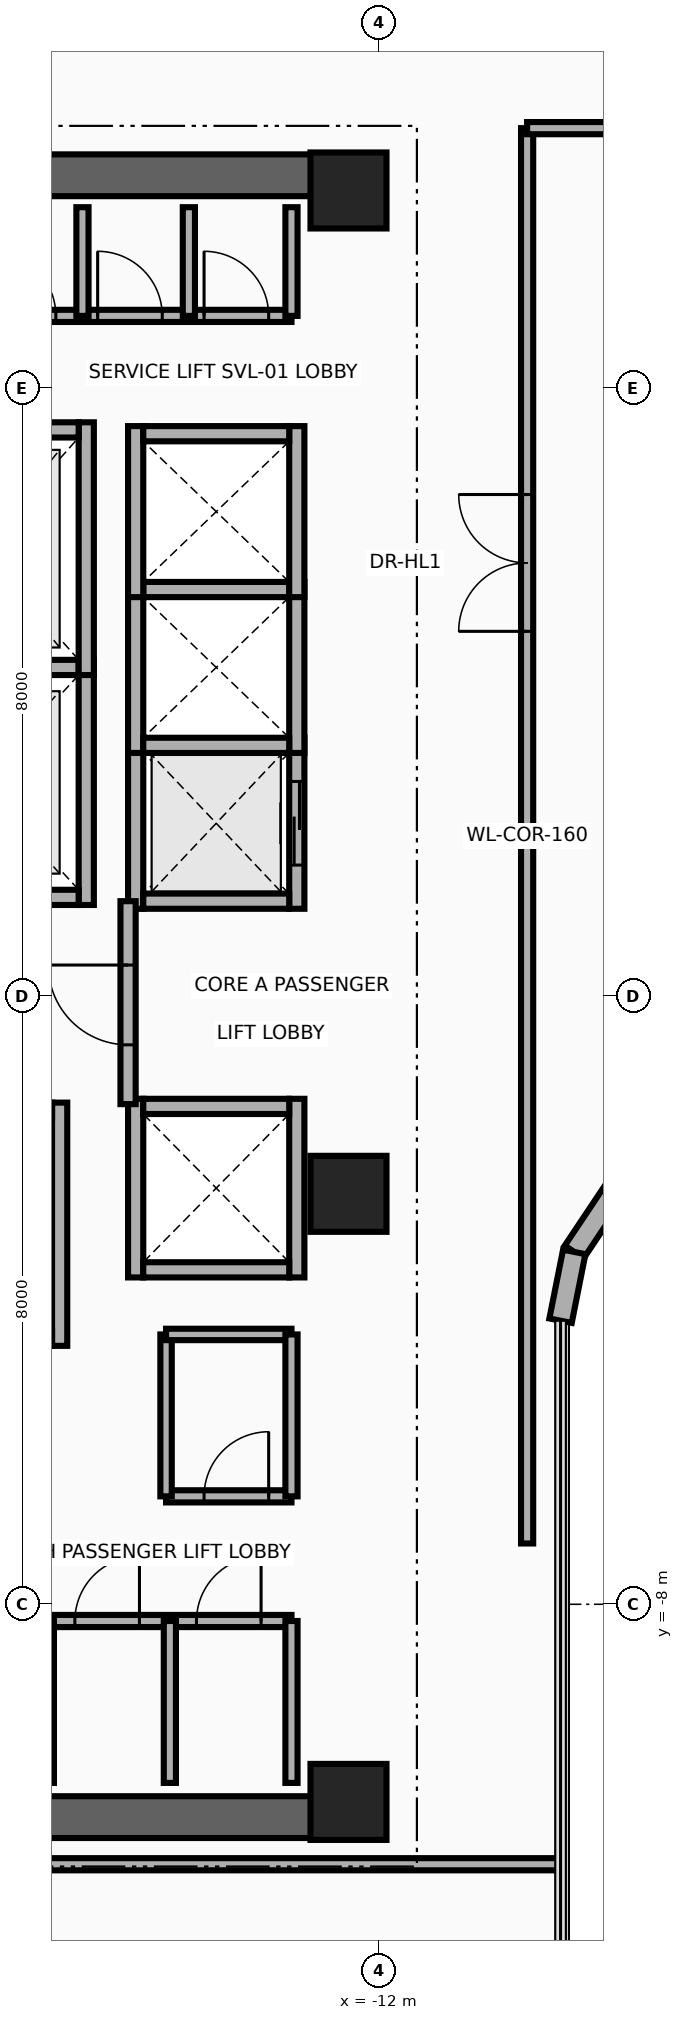
"""IFC4 building model, lengths in metres.
Left out: names, types, materials, properties, quantities, classifications, styles, units other than length and angle.
Written with IfcOpenShell. Run it as: python <this file> out.ifc"""

import sys

from ifc_helpers import new_model, si_unit, direction, frame, frame_2d, origin, origin_2d, place, context, subcontext, project, spatial, rectangle, extrude, source, transform, mapped, element, fill, save


model = new_model("IFC4")
c1 = context("Model", 3, precision=1e-05, world=origin(), true_north=direction((0.0, 1.0)))
c2 = subcontext(c1, "Body", "Model", "MODEL_VIEW")
j1 = project(units=[si_unit("LENGTHUNIT", "METRE"), si_unit("PLANEANGLEUNIT", "RADIAN")], contexts=[c1])
p1 = place(None, origin())
s1 = spatial("IfcSite", under=j1, at=p1, CompositionType="ELEMENT")
p2 = place(p1, origin())
s2 = spatial("IfcBuilding", under=s1, at=p2, CompositionType="ELEMENT")
p3 = place(p2, frame((0.0, 0.0, 184.45)))
s3 = spatial("IfcBuildingStorey", under=s2, at=p3, CompositionType="ELEMENT", Elevation=184.45)
for number, where, z_axis, x_axis in (
    (1, (-22.65, 10.8, 0.0), (0.0, 0.0, 1.0), (1.0, 0.0, 0.0)),
    (2, (-22.65, -10.8, 0.0), (0.0, 0.0, 1.0), (1.0, 0.0, 0.0)),
):
    element("IfcWall", number, at=place(p3, frame(where, z_axis=z_axis, x_axis=x_axis)), inside=s3, PredefinedType="SHEAR", context=c2, shape_type="SweptSolid", body=[
        extrude(rectangle(XDim=10.25, YDim=0.55, at=frame_2d((5.125, 0.0))), origin(), (0.0, 0.0, 1.0), 3.63),
    ])
m1 = source(origin(), c2, "Body", "SweptSolid", [
    extrude(rectangle(XDim=1.0, YDim=1.0, at=origin_2d()), origin(), (0.0, 0.0, 1.0), 3.95),
])
for number, where, z_axis, x_axis in (
    (3, (-12.4, -10.6, 0.0), (0.0, 0.0, 1.0), (1.0, 0.0, 0.0)),
    (4, (-12.4, -2.6, 0.0), (0.0, 0.0, 1.0), (1.0, 0.0, 0.0)),
    (5, (-12.4, 10.6, 0.0), (0.0, 0.0, 1.0), (1.0, 0.0, 0.0)),
):
    element("IfcColumn", number, at=place(p3, frame(where, z_axis=z_axis, x_axis=x_axis)), inside=s3, PredefinedType="COLUMN", context=c2, shape_type="MappedRepresentation", body=[
        mapped(m1, transform((0.0, 0.0, 0.0), x_axis=(1.0, 0.0, 0.0), y_axis=(0.0, 1.0, 0.0), z_axis=(0.0, 0.0, 1.0), scale=1.0)),
    ])
p4 = place(p3, frame((-8.912, -2.588, 0.0), z_axis=(0.0, 0.0, 1.0), x_axis=(-0.555364065883, -0.831607331814, 0.0)))
e6 = element("IfcWall", 6, at=p4, inside=s3, PredefinedType="SOLIDWALL", context=c2, shape_type="SweptSolid", body=[
    extrude(rectangle(XDim=0.933, YDim=0.3, at=frame_2d((0.467, 0.0))), origin(), (0.0, 0.0, 1.0), 3.63),
])
p5 = place(p3, frame((-9.43, -3.365, 0.0), z_axis=(0.0, 0.0, 1.0), x_axis=(-0.195301801101, -0.980743190895, 0.0)))
e7 = element("IfcWall", 7, at=p5, inside=s3, PredefinedType="SOLIDWALL", context=c2, shape_type="SweptSolid", body=[
    extrude(rectangle(XDim=0.923, YDim=0.3, at=frame_2d((0.461, 0.0))), origin(), (0.0, 0.0, 1.0), 3.63),
])
p6 = place(p3, frame((-15.85, 1.2, 0.0), z_axis=(0.0, 0.0, 1.0), x_axis=(0.0, 1.0, 0.0)))
e8 = element("IfcWall", 8, at=p6, inside=s3, PredefinedType="MOVABLE", context=c2, shape_type="SweptSolid", body=[
    extrude(rectangle(XDim=3.225, YDim=0.2, at=frame_2d((1.613, 0.0))), origin(), (0.0, 0.0, 1.0), 3.63),
])
p7 = place(p3, frame((-18.55, 1.3, 0.0), z_axis=(0.0, 0.0, 1.0), x_axis=(1.0, 0.0, 0.0)))
e9 = element("IfcWall", 9, at=p7, inside=s3, PredefinedType="MOVABLE", context=c2, shape_type="SweptSolid", body=[
    extrude(rectangle(XDim=2.6, YDim=0.2, at=frame_2d((1.3, 0.0))), origin(), (0.0, 0.0, 1.0), 3.63),
])
p8 = place(p7, frame((0.7, 0.0, 0.0)))
e10 = element("IfcOpeningElement", 10, at=p8, cuts=e9, PredefinedType="OPENING", context=c2, shape_type="SweptSolid", body=[
    extrude(rectangle(XDim=1.2, YDim=2.1, at=frame_2d((0.6, 1.05))), frame((0.0, 0.115, 0.0), z_axis=(0.0, -1.0, 0.0), x_axis=(1.0, 0.0, 0.0)), (0.0, 0.0, 1.0), 0.23),
])
p9 = place(p3, frame((-18.55, 4.325, 0.0), z_axis=(0.0, 0.0, 1.0), x_axis=(1.0, 0.0, 0.0)))
e11 = element("IfcWall", 11, at=p9, inside=s3, PredefinedType="MOVABLE", context=c2, shape_type="SweptSolid", body=[
    extrude(rectangle(XDim=2.6, YDim=0.2, at=frame_2d((1.3, 0.0))), origin(), (0.0, 0.0, 1.0), 3.63),
])
p10 = place(p3, frame((-16.2, -4.6, 0.0), z_axis=(0.0, 0.0, 1.0), x_axis=(0.0, 1.0, 0.0)))
e12 = element("IfcWall", 12, at=p10, inside=s3, PredefinedType="MOVABLE", context=c2, shape_type="SweptSolid", body=[
    extrude(rectangle(XDim=3.2, YDim=0.2, at=frame_2d((1.6, 0.0))), origin(), (0.0, 0.0, 1.0), 3.63),
])
p11 = place(p3, frame((-15.85, 4.225, 0.0), z_axis=(0.0, 0.0, 1.0), x_axis=(0.0, 1.0, 0.0)))
e13 = element("IfcWall", 13, at=p11, inside=s3, PredefinedType="MOVABLE", context=c2, shape_type="SweptSolid", body=[
    extrude(rectangle(XDim=3.325, YDim=0.2, at=frame_2d((1.663, 0.0))), origin(), (0.0, 0.0, 1.0), 3.63),
])
p12 = place(p3, frame((-18.55, 7.45, 0.0), z_axis=(0.0, 0.0, 1.0), x_axis=(1.0, 0.0, 0.0)))
e14 = element("IfcWall", 14, at=p12, inside=s3, PredefinedType="MOVABLE", context=c2, shape_type="SweptSolid", body=[
    extrude(rectangle(XDim=2.6, YDim=0.2, at=frame_2d((1.3, 0.0))), origin(), (0.0, 0.0, 1.0), 3.63),
])
p13 = place(p12, frame((0.7, 0.0, 0.0)))
e15 = element("IfcOpeningElement", 15, at=p13, cuts=e14, PredefinedType="OPENING", context=c2, shape_type="SweptSolid", body=[
    extrude(rectangle(XDim=1.2, YDim=2.1, at=frame_2d((0.6, 1.05))), frame((0.0, 0.115, 0.0), z_axis=(0.0, -1.0, 0.0), x_axis=(1.0, 0.0, 0.0)), (0.0, 0.0, 1.0), 0.23),
])
p14 = place(p3, frame((-15.2, 1.15, 0.0), z_axis=(0.0, 0.0, 1.0), x_axis=(0.0, 1.0, 0.0)))
e16 = element("IfcWall", 16, at=p14, inside=s3, PredefinedType="MOVABLE", context=c2, shape_type="SweptSolid", body=[
    extrude(rectangle(XDim=2.25, YDim=0.2, at=frame_2d((1.125, 0.0))), origin(), (0.0, 0.0, 1.0), 3.63),
])
p15 = place(p3, frame((-13.08, 1.15, 0.0), z_axis=(0.0, 0.0, 1.0), x_axis=(0.0, 1.0, 0.0)))
e17 = element("IfcWall", 17, at=p15, inside=s3, PredefinedType="MOVABLE", context=c2, shape_type="SweptSolid", body=[
    extrude(rectangle(XDim=2.25, YDim=0.2, at=frame_2d((1.125, 0.0))), origin(), (0.0, 0.0, 1.0), 3.63),
])
p16 = place(p15, frame((0.575, 0.0, 0.0)))
e18 = element("IfcOpeningElement", 18, at=p16, cuts=e17, PredefinedType="OPENING", context=c2, shape_type="SweptSolid", body=[
    extrude(rectangle(XDim=1.1, YDim=2.1, at=frame_2d((0.55, 1.05))), frame((0.0, 0.115, 0.0), z_axis=(0.0, -1.0, 0.0), x_axis=(1.0, 0.0, 0.0)), (0.0, 0.0, 1.0), 0.23),
])
p17 = place(p3, frame((-15.1, 1.25, 0.0), z_axis=(0.0, 0.0, 1.0), x_axis=(1.0, 0.0, 0.0)))
e19 = element("IfcWall", 19, at=p17, inside=s3, PredefinedType="MOVABLE", context=c2, shape_type="SweptSolid", body=[
    extrude(rectangle(XDim=1.92, YDim=0.2, at=frame_2d((0.96, 0.0))), origin(), (0.0, 0.0, 1.0), 3.63),
])
for number, where, z_axis, x_axis in (
    (20, (-15.2, 3.2, 0.0), (0.0, 0.0, 1.0), (0.0, 1.0, 0.0)),
    (21, (-13.08, 3.2, 0.0), (0.0, 0.0, 1.0), (0.0, 1.0, 0.0)),
):
    element("IfcWall", number, at=place(p3, frame(where, z_axis=z_axis, x_axis=x_axis)), inside=s3, PredefinedType="MOVABLE", context=c2, shape_type="SweptSolid", body=[
        extrude(rectangle(XDim=2.25, YDim=0.2, at=frame_2d((1.125, 0.0))), origin(), (0.0, 0.0, 1.0), 3.63),
    ])
for number, where, z_axis, x_axis in (
    (22, (-15.1, 3.3, 0.0), (0.0, 0.0, 1.0), (1.0, 0.0, 0.0)),
    (23, (-15.1, 5.35, 0.0), (0.0, 0.0, 1.0), (1.0, 0.0, 0.0)),
):
    element("IfcWall", number, at=place(p3, frame(where, z_axis=z_axis, x_axis=x_axis)), inside=s3, PredefinedType="MOVABLE", context=c2, shape_type="SweptSolid", body=[
        extrude(rectangle(XDim=1.92, YDim=0.2, at=frame_2d((0.96, 0.0))), origin(), (0.0, 0.0, 1.0), 3.63),
    ])
for number, where, z_axis, x_axis in (
    (24, (-15.2, 5.25, 0.0), (0.0, 0.0, 1.0), (0.0, 1.0, 0.0)),
    (25, (-13.08, 5.25, 0.0), (0.0, 0.0, 1.0), (0.0, 1.0, 0.0)),
):
    element("IfcWall", number, at=place(p3, frame(where, z_axis=z_axis, x_axis=x_axis)), inside=s3, PredefinedType="MOVABLE", context=c2, shape_type="SweptSolid", body=[
        extrude(rectangle(XDim=2.25, YDim=0.2, at=frame_2d((1.125, 0.0))), origin(), (0.0, 0.0, 1.0), 3.63),
    ])
p18 = place(p3, frame((-15.1, 7.4, 0.0), z_axis=(0.0, 0.0, 1.0), x_axis=(1.0, 0.0, 0.0)))
e26 = element("IfcWall", 26, at=p18, inside=s3, PredefinedType="MOVABLE", context=c2, shape_type="SweptSolid", body=[
    extrude(rectangle(XDim=1.92, YDim=0.2, at=frame_2d((0.96, 0.0))), origin(), (0.0, 0.0, 1.0), 3.63),
])
for number, where, z_axis, x_axis in (
    (27, (-15.2, -3.7, 0.0), (0.0, 0.0, 1.0), (0.0, 1.0, 0.0)),
    (28, (-13.08, -3.7, 0.0), (0.0, 0.0, 1.0), (0.0, 1.0, 0.0)),
):
    element("IfcWall", number, at=place(p3, frame(where, z_axis=z_axis, x_axis=x_axis)), inside=s3, PredefinedType="MOVABLE", context=c2, shape_type="SweptSolid", body=[
        extrude(rectangle(XDim=2.35, YDim=0.2, at=frame_2d((1.175, 0.0))), origin(), (0.0, 0.0, 1.0), 3.63),
    ])
for number, where, z_axis, x_axis in (
    (29, (-15.1, -3.6, 0.0), (0.0, 0.0, 1.0), (1.0, 0.0, 0.0)),
    (30, (-15.1, -1.45, 0.0), (0.0, 0.0, 1.0), (1.0, 0.0, 0.0)),
):
    element("IfcWall", number, at=place(p3, frame(where, z_axis=z_axis, x_axis=x_axis)), inside=s3, PredefinedType="MOVABLE", context=c2, shape_type="SweptSolid", body=[
        extrude(rectangle(XDim=1.92, YDim=0.2, at=frame_2d((0.96, 0.0))), origin(), (0.0, 0.0, 1.0), 3.63),
    ])
p19 = place(p3, frame((-15.3, -1.42, 0.0), z_axis=(0.0, 0.0, 1.0), x_axis=(0.0, 1.0, 0.0)))
e31 = element("IfcWall", 31, at=p19, inside=s3, PredefinedType="PARTITIONING", context=c2, shape_type="SweptSolid", body=[
    extrude(rectangle(XDim=2.67, YDim=0.2, at=frame_2d((1.335, 0.0))), origin(), (0.0, 0.0, 1.0), 3.63),
])
p20 = place(p19, frame((0.78, 0.0, 0.0)))
e32 = element("IfcOpeningElement", 32, at=p20, cuts=e31, PredefinedType="OPENING", context=c2, shape_type="SweptSolid", body=[
    extrude(rectangle(XDim=1.05, YDim=2.15, at=frame_2d((0.525, 1.075))), frame((0.0, 0.115, 0.0), z_axis=(0.0, -1.0, 0.0), x_axis=(1.0, 0.0, 0.0)), (0.0, 0.0, 1.0), 0.23),
])
p21 = place(p3, frame((-18.65, 8.95, 0.0), z_axis=(0.0, 0.0, 1.0), x_axis=(1.0, 0.0, 0.0)))
e33 = element("IfcWall", 33, at=p21, inside=s3, PredefinedType="PARTITIONING", context=c2, shape_type="SweptSolid", body=[
    extrude(rectangle(XDim=5.5, YDim=0.16, at=frame_2d((2.75, 0.0))), origin(), (0.0, 0.0, 1.0), 3.63),
])
p22 = place(p21, frame((0.3, 0.0, 0.0)))
e34 = element("IfcOpeningElement", 34, at=p22, cuts=e33, PredefinedType="OPENING", context=c2, shape_type="SweptSolid", body=[
    extrude(rectangle(XDim=0.85, YDim=2.05, at=frame_2d((0.425, 1.025))), frame((0.0, 0.095, 0.0), z_axis=(0.0, -1.0, 0.0), x_axis=(1.0, 0.0, 0.0)), (0.0, 0.0, 1.0), 0.19),
])
p23 = place(p21, frame((1.55, 0.0, 0.0)))
e35 = element("IfcOpeningElement", 35, at=p23, cuts=e33, PredefinedType="OPENING", context=c2, shape_type="SweptSolid", body=[
    extrude(rectangle(XDim=0.85, YDim=2.05, at=frame_2d((0.425, 1.025))), frame((0.0, 0.095, 0.0), z_axis=(0.0, -1.0, 0.0), x_axis=(1.0, 0.0, 0.0)), (0.0, 0.0, 1.0), 0.19),
])
p24 = place(p21, frame((2.95, 0.0, 0.0)))
e36 = element("IfcOpeningElement", 36, at=p24, cuts=e33, PredefinedType="OPENING", context=c2, shape_type="SweptSolid", body=[
    extrude(rectangle(XDim=0.85, YDim=2.05, at=frame_2d((0.425, 1.025))), frame((0.0, 0.095, 0.0), z_axis=(0.0, -1.0, 0.0), x_axis=(1.0, 0.0, 0.0)), (0.0, 0.0, 1.0), 0.19),
])
p25 = place(p21, frame((4.35, 0.0, 0.0)))
e37 = element("IfcOpeningElement", 37, at=p25, cuts=e33, PredefinedType="OPENING", context=c2, shape_type="SweptSolid", body=[
    extrude(rectangle(XDim=0.85, YDim=2.05, at=frame_2d((0.425, 1.025))), frame((0.0, 0.095, 0.0), z_axis=(0.0, -1.0, 0.0), x_axis=(1.0, 0.0, 0.0)), (0.0, 0.0, 1.0), 0.19),
])
for number, where, z_axis, x_axis in (
    (38, (-13.15, 8.95, 0.0), (0.0, 0.0, 1.0), (0.0, 1.0, 0.0)),
    (39, (-15.9, 8.95, 0.0), (0.0, 0.0, 1.0), (0.0, 1.0, 0.0)),
    (40, (-14.5, 8.95, 0.0), (0.0, 0.0, 1.0), (0.0, 1.0, 0.0)),
):
    element("IfcWall", number, at=place(p3, frame(where, z_axis=z_axis, x_axis=x_axis)), inside=s3, PredefinedType="PARTITIONING", context=c2, shape_type="SweptSolid", body=[
        extrude(rectangle(XDim=1.43, YDim=0.16, at=frame_2d((0.715, 0.0))), origin(), (0.0, 0.0, 1.0), 3.63),
    ])
p26 = place(p3, frame((-16.35, -8.22, 0.0), z_axis=(0.0, 0.0, 1.0), x_axis=(1.0, 0.0, 0.0)))
e41 = element("IfcWall", 41, at=p26, inside=s3, PredefinedType="PARTITIONING", context=c2, shape_type="SweptSolid", body=[
    extrude(rectangle(XDim=3.2, YDim=0.16, at=frame_2d((1.6, 0.0))), origin(), (0.0, 0.0, 1.0), 3.63),
])
p27 = place(p26, frame((0.35, 0.0, 0.0)))
e42 = element("IfcOpeningElement", 42, at=p27, cuts=e41, PredefinedType="OPENING", context=c2, shape_type="SweptSolid", body=[
    extrude(rectangle(XDim=0.85, YDim=2.05, at=frame_2d((0.425, 1.025))), frame((0.0, 0.095, 0.0), z_axis=(0.0, -1.0, 0.0), x_axis=(1.0, 0.0, 0.0)), (0.0, 0.0, 1.0), 0.19),
])
p28 = place(p26, frame((1.95, 0.0, 0.0)))
e43 = element("IfcOpeningElement", 43, at=p28, cuts=e41, PredefinedType="OPENING", context=c2, shape_type="SweptSolid", body=[
    extrude(rectangle(XDim=0.85, YDim=2.05, at=frame_2d((0.425, 1.025))), frame((0.0, 0.095, 0.0), z_axis=(0.0, -1.0, 0.0), x_axis=(1.0, 0.0, 0.0)), (0.0, 0.0, 1.0), 0.19),
])
p29 = place(p3, frame((-16.35, -10.35, 0.0), z_axis=(0.0, 0.0, 1.0), x_axis=(0.0, 1.0, 0.0)))
e44 = element("IfcWall", 44, at=p29, inside=s3, PredefinedType="PARTITIONING", context=c2, shape_type="SweptSolid", body=[
    extrude(rectangle(XDim=2.13, YDim=0.15, at=frame_2d((1.065, 0.0))), origin(), (0.0, 0.0, 1.0), 3.63),
])
for number, where, z_axis, x_axis in (
    (45, (-13.15, -10.35, 0.0), (0.0, 0.0, 1.0), (0.0, 1.0, 0.0)),
    (46, (-14.75, -10.35, 0.0), (0.0, 0.0, 1.0), (0.0, 1.0, 0.0)),
):
    element("IfcWall", number, at=place(p3, frame(where, z_axis=z_axis, x_axis=x_axis)), inside=s3, PredefinedType="PARTITIONING", context=c2, shape_type="SweptSolid", body=[
        extrude(rectangle(XDim=2.13, YDim=0.16, at=frame_2d((1.065, 0.0))), origin(), (0.0, 0.0, 1.0), 3.63),
    ])
p30 = place(p3, frame((-14.8, -6.58, 0.0), z_axis=(0.0, 0.0, 1.0), x_axis=(1.0, 0.0, 0.0)))
e47 = element("IfcWall", 47, at=p30, inside=s3, PredefinedType="PARTITIONING", context=c2, shape_type="SweptSolid", body=[
    extrude(rectangle(XDim=1.65, YDim=0.16, at=frame_2d((0.825, 0.0))), origin(), (0.0, 0.0, 1.0), 3.63),
])
p31 = place(p30, frame((0.5, 0.0, 0.0)))
e48 = element("IfcOpeningElement", 48, at=p31, cuts=e47, PredefinedType="OPENING", context=c2, shape_type="SweptSolid", body=[
    extrude(rectangle(XDim=0.85, YDim=2.05, at=frame_2d((0.425, 1.025))), frame((0.0, 0.095, 0.0), z_axis=(0.0, -1.0, 0.0), x_axis=(1.0, 0.0, 0.0)), (0.0, 0.0, 1.0), 0.19),
])
p32 = place(p3, frame((-14.8, -6.58, 0.0), z_axis=(0.0, 0.0, 1.0), x_axis=(0.0, 1.0, 0.0)))
e49 = element("IfcWall", 49, at=p32, inside=s3, PredefinedType="PARTITIONING", context=c2, shape_type="SweptSolid", body=[
    extrude(rectangle(XDim=2.13, YDim=0.15, at=frame_2d((1.065, 0.0))), origin(), (0.0, 0.0, 1.0), 3.63),
])
p33 = place(p3, frame((-14.8, -4.45, 0.0), z_axis=(0.0, 0.0, 1.0), x_axis=(1.0, 0.0, 0.0)))
e50 = element("IfcWall", 50, at=p33, inside=s3, PredefinedType="PARTITIONING", context=c2, shape_type="SweptSolid", body=[
    extrude(rectangle(XDim=1.65, YDim=0.15, at=frame_2d((0.825, 0.0))), origin(), (0.0, 0.0, 1.0), 3.63),
])
p34 = place(p3, frame((-13.15, -6.58, 0.0), z_axis=(0.0, 0.0, 1.0), x_axis=(0.0, 1.0, 0.0)))
e51 = element("IfcWall", 51, at=p34, inside=s3, PredefinedType="PARTITIONING", context=c2, shape_type="SweptSolid", body=[
    extrude(rectangle(XDim=2.13, YDim=0.16, at=frame_2d((1.065, 0.0))), origin(), (0.0, 0.0, 1.0), 3.63),
])
p35 = place(p3, frame((-23.45, -11.42, 0.0), z_axis=(0.0, 0.0, 1.0), x_axis=(1.0, 0.0, 0.0)))
e52 = element("IfcWall", 52, at=p35, inside=s3, PredefinedType="PARTITIONING", context=c2, shape_type="SweptSolid", body=[
    extrude(rectangle(XDim=13.84, YDim=0.16, at=frame_2d((6.92, 0.0))), origin(), (0.0, 0.0, 1.0), 3.004),
])
p36 = place(p3, frame((-10.05, -7.2, 0.0), z_axis=(0.0, 0.0, 1.0), x_axis=(0.0, 1.0, 0.0)))
e53 = element("IfcWall", 53, at=p36, inside=s3, PredefinedType="PARTITIONING", context=c2, shape_type="SweptSolid", body=[
    extrude(rectangle(XDim=18.62, YDim=0.16, at=frame_2d((9.31, 0.0))), origin(), (0.0, 0.0, 1.0), 2.415),
])
p37 = place(p36, frame((12.0, 0.0, 0.0)))
e54 = element("IfcOpeningElement", 54, at=p37, cuts=e53, PredefinedType="OPENING", context=c2, shape_type="SweptSolid", body=[
    extrude(rectangle(XDim=1.8, YDim=2.15, at=frame_2d((0.9, 1.075))), frame((0.0, 0.095, 0.0), z_axis=(0.0, -1.0, 0.0), x_axis=(1.0, 0.0, 0.0)), (0.0, 0.0, 1.0), 0.19),
])
p38 = place(p3, frame((-10.05, 11.42, 0.0), z_axis=(0.0, 0.0, 1.0), x_axis=(1.0, 0.0, 0.0)))
e55 = element("IfcWall", 55, at=p38, inside=s3, PredefinedType="PARTITIONING", context=c2, shape_type="SweptSolid", body=[
    extrude(rectangle(XDim=7.85, YDim=0.16, at=frame_2d((3.925, 0.0))), origin(), (0.0, 0.0, 1.0), 2.615),
])
p39 = place(p16, origin())
e56 = element("IfcDoor", 56, at=p39, inside=s3, OperationType="DOUBLE_DOOR_SLIDING", PredefinedType="DOOR", context=c2, shape_type="SweptSolid", body=[
    extrude(rectangle(XDim=1.1, YDim=2.1, at=frame_2d((0.55, 1.05))), frame((0.0, 0.025, 0.0), z_axis=(0.0, -1.0, 0.0), x_axis=(1.0, 0.0, 0.0)), (0.0, 0.0, 1.0), 0.05),
])
fill(e18, e56)
p40 = place(p20, origin())
e57 = element("IfcDoor", 57, at=p40, inside=s3, OperationType="SINGLE_SWING_RIGHT", PredefinedType="DOOR", context=c2, shape_type="SweptSolid", body=[
    extrude(rectangle(XDim=1.05, YDim=2.15, at=frame_2d((0.525, 1.075))), frame((0.0, 0.025, 0.0), z_axis=(0.0, -1.0, 0.0), x_axis=(1.0, 0.0, 0.0)), (0.0, 0.0, 1.0), 0.05),
])
fill(e32, e57)
p41 = place(p23, origin())
e58 = element("IfcDoor", 58, at=p41, inside=s3, OperationType="SINGLE_SWING_RIGHT", PredefinedType="DOOR", context=c2, shape_type="SweptSolid", body=[
    extrude(rectangle(XDim=0.85, YDim=2.05, at=frame_2d((0.425, 1.025))), frame((0.0, 0.025, 0.0), z_axis=(0.0, -1.0, 0.0), x_axis=(1.0, 0.0, 0.0)), (0.0, 0.0, 1.0), 0.05),
])
fill(e35, e58)
p42 = place(p24, origin())
e59 = element("IfcDoor", 59, at=p42, inside=s3, OperationType="SINGLE_SWING_LEFT", PredefinedType="DOOR", context=c2, shape_type="SweptSolid", body=[
    extrude(rectangle(XDim=0.85, YDim=2.05, at=frame_2d((0.425, 1.025))), frame((0.0, 0.025, 0.0), z_axis=(0.0, -1.0, 0.0), x_axis=(1.0, 0.0, 0.0)), (0.0, 0.0, 1.0), 0.05),
])
fill(e36, e59)
p43 = place(p25, origin())
e60 = element("IfcDoor", 60, at=p43, inside=s3, OperationType="SINGLE_SWING_RIGHT", PredefinedType="DOOR", context=c2, shape_type="SweptSolid", body=[
    extrude(rectangle(XDim=0.85, YDim=2.05, at=frame_2d((0.425, 1.025))), frame((0.0, 0.025, 0.0), z_axis=(0.0, -1.0, 0.0), x_axis=(1.0, 0.0, 0.0)), (0.0, 0.0, 1.0), 0.05),
])
fill(e37, e60)
p44 = place(p27, origin())
e61 = element("IfcDoor", 61, at=p44, inside=s3, OperationType="SINGLE_SWING_LEFT", PredefinedType="DOOR", context=c2, shape_type="SweptSolid", body=[
    extrude(rectangle(XDim=0.85, YDim=2.05, at=frame_2d((0.425, 1.025))), frame((0.0, 0.025, 0.0), z_axis=(0.0, -1.0, 0.0), x_axis=(1.0, 0.0, 0.0)), (0.0, 0.0, 1.0), 0.05),
])
fill(e42, e61)
p45 = place(p28, origin())
e62 = element("IfcDoor", 62, at=p45, inside=s3, OperationType="SINGLE_SWING_RIGHT", PredefinedType="DOOR", context=c2, shape_type="SweptSolid", body=[
    extrude(rectangle(XDim=0.85, YDim=2.05, at=frame_2d((0.425, 1.025))), frame((0.0, 0.025, 0.0), z_axis=(0.0, -1.0, 0.0), x_axis=(1.0, 0.0, 0.0)), (0.0, 0.0, 1.0), 0.05),
])
fill(e43, e62)
p46 = place(p31, origin())
e63 = element("IfcDoor", 63, at=p46, inside=s3, OperationType="SINGLE_SWING_LEFT", PredefinedType="DOOR", context=c2, shape_type="SweptSolid", body=[
    extrude(rectangle(XDim=0.85, YDim=2.05, at=frame_2d((0.425, 1.025))), frame((0.0, 0.025, 0.0), z_axis=(0.0, -1.0, 0.0), x_axis=(1.0, 0.0, 0.0)), (0.0, 0.0, 1.0), 0.05),
])
fill(e48, e63)
p47 = place(p37, origin())
e64 = element("IfcDoor", 64, at=p47, inside=s3, OperationType="DOUBLE_DOOR_SINGLE_SWING", PredefinedType="DOOR", context=c2, shape_type="SweptSolid", body=[
    extrude(rectangle(XDim=1.8, YDim=2.15, at=frame_2d((0.9, 1.075))), frame((0.0, 0.025, 0.0), z_axis=(0.0, -1.0, 0.0), x_axis=(1.0, 0.0, 0.0)), (0.0, 0.0, 1.0), 0.05),
])
fill(e54, e64)
save(model, sys.argv[1])
